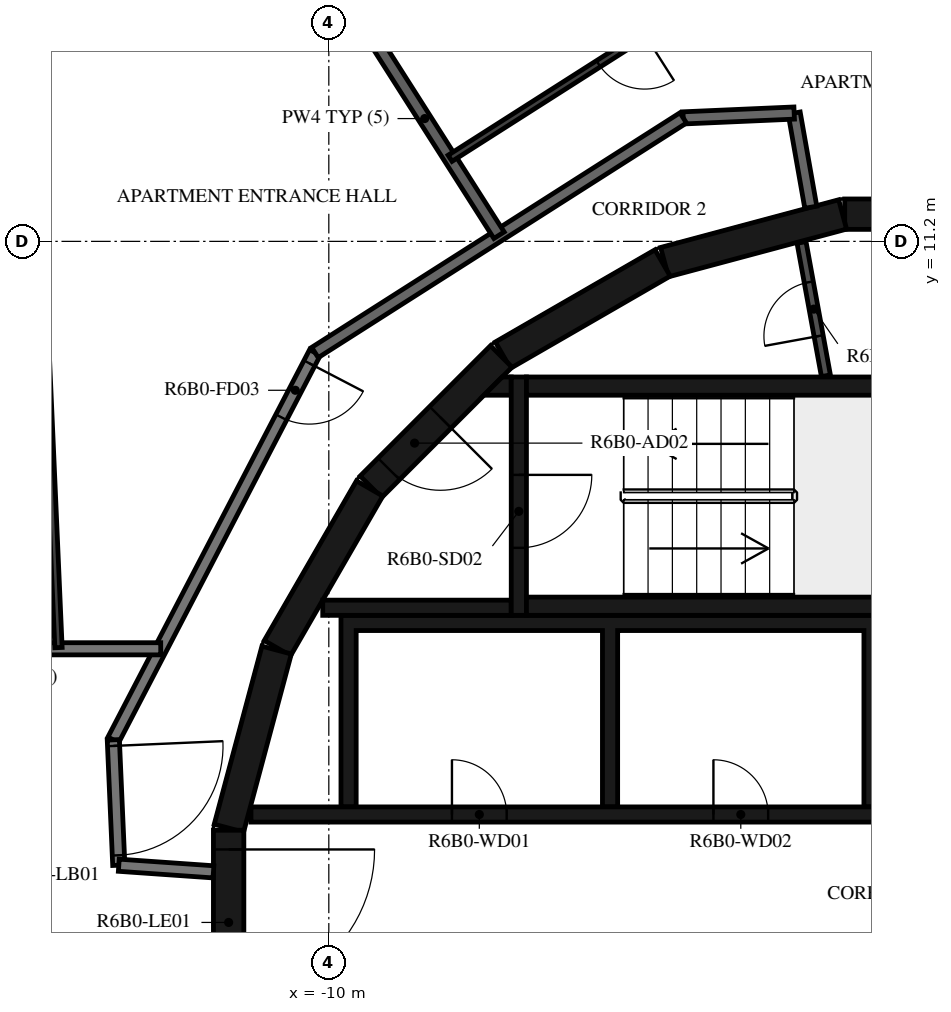
"""IFC4 building model, lengths in metres.
Left out: names, types, materials, properties, quantities, classifications, styles, units other than length and angle.
Written with IfcOpenShell. Run it as: python <this file> out.ifc"""

import sys

from ifc_helpers import new_model, si_unit, direction, frame, frame_2d, origin, place, context, subcontext, project, spatial, polyline, rectangle, outline, extrude, element, fill, save


model = new_model("IFC4")
c1 = context("Model", 3, precision=1e-05, world=origin(), true_north=direction((0.0, 1.0)))
c2 = subcontext(c1, "Body", "Model", "MODEL_VIEW")
j1 = project(units=[si_unit("LENGTHUNIT", "METRE"), si_unit("PLANEANGLEUNIT", "RADIAN")], contexts=[c1])
p1 = place(None, origin())
s1 = spatial("IfcSite", under=j1, at=p1, CompositionType="ELEMENT")
p2 = place(p1, origin())
s2 = spatial("IfcBuilding", under=s1, at=p2, CompositionType="ELEMENT")
p3 = place(p2, frame((0.0, 0.0, 240.7)))
s3 = spatial("IfcBuildingStorey", under=s2, at=p3, CompositionType="ELEMENT", Elevation=240.7)
for number, where, z_axis, x_axis in (
    (1, (1.516, 11.647, 0.0), (0.0, 0.0, 1.0), (-1.0, 0.0, 0.0)),
    (2, (-1.55, 11.643, 0.0), (0.0, 0.0, 1.0), (-0.966, -0.259, 0.0)),
    (3, (-4.51, 10.845, 0.0), (0.0, 0.0, 1.0), (-0.866, -0.5, 0.0)),
):
    element("IfcWall", number, at=place(p3, frame(where, z_axis=z_axis, x_axis=x_axis)), inside=s3, PredefinedType="SHEAR", context=c2, shape_type="SweptSolid", body=[
        extrude(rectangle(XDim=3.033, YDim=0.5, at=frame_2d((1.516, 0.0))), origin(), (0.0, 0.0, 1.0), 3.12),
    ])
p4 = place(p3, frame((-7.164, 9.308, 0.0), z_axis=(0.0, 0.0, 1.0), x_axis=(-0.707106781187, -0.707106781187, 0.0)))
e4 = element("IfcWall", 4, at=p4, inside=s3, PredefinedType="SHEAR", context=c2, shape_type="SweptSolid", body=[
    extrude(rectangle(XDim=3.032, YDim=0.5, at=frame_2d((1.516, 0.0))), origin(), (0.0, 0.0, 1.0), 3.12),
])
p5 = place(p4, frame((1.416, 0.0, 0.0)))
e5 = element("IfcOpeningElement", 5, at=p5, cuts=e4, PredefinedType="OPENING", context=c2, shape_type="SweptSolid", body=[
    extrude(rectangle(XDim=1.2, YDim=2.1, at=frame_2d((0.6, 1.05))), frame((0.0, 0.26, 0.0), z_axis=(0.0, -1.0, 0.0), x_axis=(1.0, 0.0, 0.0)), (0.0, 0.0, 1.0), 0.52),
])
for number, where, z_axis, x_axis in (
    (6, (-9.329, 7.137, 0.0), (0.0, 0.0, 1.0), (-0.5, -0.866, 0.0)),
    (7, (-10.858, 4.479, 0.0), (0.0, 0.0, 1.0), (-0.259, -0.966, 0.0)),
):
    element("IfcWall", number, at=place(p3, frame(where, z_axis=z_axis, x_axis=x_axis)), inside=s3, PredefinedType="SHEAR", context=c2, shape_type="SweptSolid", body=[
        extrude(rectangle(XDim=3.033, YDim=0.5, at=frame_2d((1.516, 0.0))), origin(), (0.0, 0.0, 1.0), 3.12),
    ])
p6 = place(p3, frame((-11.647, 1.516, 0.0), z_axis=(0.0, 0.0, 1.0), x_axis=(0.0, -1.0, 0.0)))
e8 = element("IfcWall", 8, at=p6, inside=s3, PredefinedType="SHEAR", context=c2, shape_type="SweptSolid", body=[
    extrude(rectangle(XDim=3.033, YDim=0.5, at=frame_2d((1.516, 0.0))), origin(), (0.0, 0.0, 1.0), 3.12),
])
p7 = place(p6, frame((0.316, 0.0, 0.0)))
e9 = element("IfcOpeningElement", 9, at=p7, cuts=e8, PredefinedType="OPENING", context=c2, shape_type="SweptSolid", body=[
    extrude(rectangle(XDim=2.4, YDim=2.1, at=frame_2d((1.2, 1.05))), frame((0.0, 0.26, 0.0), z_axis=(0.0, -1.0, 0.0), x_axis=(1.0, 0.0, 0.0)), (0.0, 0.0, 1.0), 0.52),
])
for number, where, z_axis, x_axis in (
    (10, (-6.75, 5.2, 0.0), (0.0, 0.0, 1.0), (1.0, 0.0, 0.0)),
    (11, (-6.75, 8.82, 0.0), (0.0, 0.0, 1.0), (1.0, 0.0, 0.0)),
):
    element("IfcWall", number, at=place(p3, frame(where, z_axis=z_axis, x_axis=x_axis)), inside=s3, PredefinedType="SHEAR", context=c2, shape_type="SweptSolid", body=[
        extrude(rectangle(XDim=6.75, YDim=0.3, at=frame_2d((3.375, 0.0))), origin(), (0.0, 0.0, 1.0), 3.12),
    ])
p8 = place(p3, frame((-6.875, 8.97, 0.0), z_axis=(0.0, 0.0, 1.0), x_axis=(0.0, -1.0, 0.0)))
e12 = element("IfcWall", 12, at=p8, inside=s3, PredefinedType="SHEAR", context=c2, shape_type="SweptSolid", body=[
    extrude(rectangle(XDim=3.92, YDim=0.25, at=frame_2d((1.96, 0.0))), origin(), (0.0, 0.0, 1.0), 3.12),
])
p9 = place(p8, frame((1.61, 0.0, 0.0)))
e13 = element("IfcOpeningElement", 13, at=p9, cuts=e12, PredefinedType="OPENING", context=c2, shape_type="SweptSolid", body=[
    extrude(rectangle(XDim=1.2, YDim=2.1, at=frame_2d((0.6, 1.05))), frame((0.0, 0.135, 0.0), z_axis=(0.0, -1.0, 0.0), x_axis=(1.0, 0.0, 0.0)), (0.0, 0.0, 1.0), 0.27),
])
p10 = place(p3, frame((-7.0, 5.175, 0.0), z_axis=(0.0, 0.0, 1.0), x_axis=(-1.0, 0.0, 0.0)))
e14 = element("IfcWall", 14, at=p10, inside=s3, PredefinedType="SHEAR", context=c2, shape_type="SweptSolid", body=[
    extrude(rectangle(XDim=3.1, YDim=0.25, at=frame_2d((1.55, 0.0))), origin(), (0.0, 0.0, 1.0), 3.12),
])
p11 = place(p3, origin())
e15 = element("IfcWall", 15, at=p11, inside=s3, PredefinedType="SHEAR", context=c2, shape_type="SweptSolid", body=[
    extrude(outline(polyline([(-7.148, 8.97), (-7.0, 8.97), (-7.0, 8.67), (-7.448, 8.67), (-7.148, 8.97)])), origin(), (0.0, 0.0, 1.0), 3.12),
])
p12 = place(p3, origin())
e16 = element("IfcWall", 16, at=p12, inside=s3, PredefinedType="SHEAR", context=c2, shape_type="SweptSolid", body=[
    extrude(outline(polyline([(-9.55, 4.8), (-5.5, 4.8), (-5.5, 1.9), (-5.25, 1.9), (-5.25, 4.8), (-1.2, 4.8), (-1.2, 1.9), (-0.95, 1.9), (-0.95, 4.8), (0.95, 4.8), (0.95, 1.9), (1.2, 1.9), (1.2, 4.8), (3.1, 4.8), (3.1, 1.9), (3.35, 1.9), (3.35, 4.8), (5.25, 4.8), (5.25, 1.9), (5.5, 1.9), (5.5, 4.8), (7.4, 4.8), (7.4, 1.9), (7.65, 1.9), (7.65, 4.8), (9.55, 4.8), (9.55, 1.9), (9.8, 1.9), (9.8, 4.8), (9.8, 5.05), (-9.8, 5.05), (-9.8, 4.8), (-9.8, 1.9), (-9.55, 1.9), (-9.55, 4.8)])), origin(), (0.0, 0.0, 1.0), 3.12),
])
p13 = place(p3, frame((-11.28, 1.775, 0.0), z_axis=(0.0, 0.0, 1.0), x_axis=(1.0, 0.0, 0.0)))
e17 = element("IfcWall", 17, at=p13, inside=s3, PredefinedType="SHEAR", context=c2, shape_type="SweptSolid", body=[
    extrude(rectangle(XDim=14.38, YDim=0.25, at=frame_2d((7.19, 0.0))), origin(), (0.0, 0.0, 1.0), 3.12),
])
p14 = place(p13, frame((10.73, 0.0, 0.0)))
e18 = element("IfcOpeningElement", 18, at=p14, cuts=e17, PredefinedType="OPENING", context=c2, shape_type="SweptSolid", body=[
    extrude(rectangle(XDim=1.1, YDim=2.1, at=frame_2d((0.55, 1.05))), frame((0.0, 0.135, 0.0), z_axis=(0.0, -1.0, 0.0), x_axis=(1.0, 0.0, 0.0)), (0.0, 0.0, 1.0), 0.27),
])
p15 = place(p13, frame((12.88, 0.0, 0.0)))
e19 = element("IfcOpeningElement", 19, at=p15, cuts=e17, PredefinedType="OPENING", context=c2, shape_type="SweptSolid", body=[
    extrude(rectangle(XDim=1.1, YDim=2.1, at=frame_2d((0.55, 1.05))), frame((0.0, 0.135, 0.0), z_axis=(0.0, -1.0, 0.0), x_axis=(1.0, 0.0, 0.0)), (0.0, 0.0, 1.0), 0.27),
])
p16 = place(p13, frame((3.305, 0.0, 0.0)))
e20 = element("IfcOpeningElement", 20, at=p16, cuts=e17, PredefinedType="OPENING", context=c2, shape_type="SweptSolid", body=[
    extrude(rectangle(XDim=0.9, YDim=2.1, at=frame_2d((0.45, 1.05))), frame((0.0, 0.135, 0.0), z_axis=(0.0, -1.0, 0.0), x_axis=(1.0, 0.0, 0.0)), (0.0, 0.0, 1.0), 0.27),
])
p17 = place(p13, frame((7.605, 0.0, 0.0)))
e21 = element("IfcOpeningElement", 21, at=p17, cuts=e17, PredefinedType="OPENING", context=c2, shape_type="SweptSolid", body=[
    extrude(rectangle(XDim=0.9, YDim=2.1, at=frame_2d((0.45, 1.05))), frame((0.0, 0.135, 0.0), z_axis=(0.0, -1.0, 0.0), x_axis=(1.0, 0.0, 0.0)), (0.0, 0.0, 1.0), 0.27),
])
p18 = place(p3, frame((-1.825, 8.99, 0.0), z_axis=(0.0, 0.0, 1.0), x_axis=(-0.179955206115, 0.983674805915, 0.0)))
e22 = element("IfcWall", 22, at=p18, inside=s3, PredefinedType="PARTITIONING", context=c2, shape_type="SweptSolid", body=[
    extrude(rectangle(XDim=2.229, YDim=0.15, at=frame_2d((1.115, 0.0))), origin(), (0.0, 0.0, 1.0), 3.12),
])
p19 = place(p18, frame((0.665, 0.0, 0.0)))
e23 = element("IfcOpeningElement", 23, at=p19, cuts=e22, PredefinedType="OPENING", context=c2, shape_type="SweptSolid", body=[
    extrude(rectangle(XDim=0.9, YDim=2.1, at=frame_2d((0.45, 1.05))), frame((0.0, 0.085, 0.0), z_axis=(0.0, -1.0, 0.0), x_axis=(1.0, 0.0, 0.0)), (0.0, 0.0, 1.0), 0.17),
])
p20 = place(p3, frame((-10.228, 9.372, 0.0), z_axis=(0.0, 0.0, 1.0), x_axis=(-0.461759464021, -0.887005184532, 0.0)))
e24 = element("IfcWall", 24, at=p20, inside=s3, PredefinedType="STANDARD", context=c2, shape_type="SweptSolid", body=[
    extrude(rectangle(XDim=7.181, YDim=0.2, at=frame_2d((3.591, 0.0))), origin(), (0.0, 0.0, 1.0), 3.12),
])
p21 = place(p20, frame((0.2, 0.0, 0.0)))
e25 = element("IfcOpeningElement", 25, at=p21, cuts=e24, PredefinedType="OPENING", context=c2, shape_type="SweptSolid", body=[
    extrude(rectangle(XDim=1.0, YDim=2.1, at=frame_2d((0.5, 1.05))), frame((0.0, 0.11, 0.0), z_axis=(0.0, -1.0, 0.0), x_axis=(1.0, 0.0, 0.0)), (0.0, 0.0, 1.0), 0.22),
])
p22 = place(p3, frame((-13.544, 3.003, 0.0), z_axis=(0.0, 0.0, 1.0), x_axis=(0.043652842459, -0.99904676034, 0.0)))
e26 = element("IfcWall", 26, at=p22, inside=s3, PredefinedType="STANDARD", context=c2, shape_type="SweptSolid", body=[
    extrude(rectangle(XDim=2.064, YDim=0.2, at=frame_2d((1.032, 0.0))), origin(), (0.0, 0.0, 1.0), 3.12),
])
p23 = place(p22, frame((0.1, 0.0, 0.0)))
e27 = element("IfcOpeningElement", 27, at=p23, cuts=e26, PredefinedType="OPENING", context=c2, shape_type="SweptSolid", body=[
    extrude(rectangle(XDim=1.8, YDim=2.1, at=frame_2d((0.9, 1.05))), frame((0.0, 0.11, 0.0), z_axis=(0.0, -1.0, 0.0), x_axis=(1.0, 0.0, 0.0)), (0.0, 0.0, 1.0), 0.22),
])
p24 = place(p3, frame((-13.454, 0.941, 0.0), z_axis=(0.0, 0.0, 1.0), x_axis=(0.99755155062, -0.069934997354, 0.0)))
e28 = element("IfcWall", 28, at=p24, inside=s3, PredefinedType="STANDARD", context=c2, shape_type="SweptSolid", body=[
    extrude(rectangle(XDim=1.561, YDim=0.2, at=frame_2d((0.78, 0.0))), origin(), (0.0, 0.0, 1.0), 3.12),
])
p25 = place(p3, frame((-2.074, 11.761, 0.0), z_axis=(0.0, 0.0, 1.0), x_axis=(-0.173679082312, 0.984802303189, 0.0)))
e29 = element("IfcWall", 29, at=p25, inside=s3, PredefinedType="STANDARD", context=c2, shape_type="SweptSolid", body=[
    extrude(rectangle(XDim=1.573, YDim=0.2, at=frame_2d((0.787, 0.0))), origin(), (0.0, 0.0, 1.0), 3.12),
])
p26 = place(p3, frame((-2.347, 13.31, 0.0), z_axis=(0.0, 0.0, 1.0), x_axis=(-0.999050095671, -0.043576442492, 0.0)))
e30 = element("IfcWall", 30, at=p26, inside=s3, PredefinedType="STANDARD", context=c2, shape_type="SweptSolid", body=[
    extrude(rectangle(XDim=1.826, YDim=0.2, at=frame_2d((0.913, 0.0))), origin(), (0.0, 0.0, 1.0), 3.12),
])
p27 = place(p3, frame((-4.172, 13.231, 0.0), z_axis=(0.0, 0.0, 1.0), x_axis=(-0.843388394728, -0.537304397561, 0.0)))
e31 = element("IfcWall", 31, at=p27, inside=s3, PredefinedType="STANDARD", context=c2, shape_type="SweptSolid", body=[
    extrude(rectangle(XDim=7.181, YDim=0.2, at=frame_2d((3.59, 0.0))), origin(), (0.0, 0.0, 1.0), 3.12),
])
p28 = place(p3, frame((-12.764, 4.5, 0.0), z_axis=(0.0, 0.0, 1.0), x_axis=(-1.0, 0.0, 0.0)))
e32 = element("IfcWall", 32, at=p28, inside=s3, PredefinedType="STANDARD", context=c2, shape_type="SweptSolid", body=[
    extrude(rectangle(XDim=5.135, YDim=0.2, at=frame_2d((2.568, 0.0))), origin(), (0.0, 0.0, 1.0), 3.12),
])
p29 = place(p3, frame((-9.645, 15.138, 0.0), z_axis=(0.0, 0.0, 1.0), x_axis=(0.537267800866, -0.84341170857, 0.0)))
e33 = element("IfcWall", 33, at=p29, inside=s3, PredefinedType="STANDARD", context=c2, shape_type="SweptSolid", body=[
    extrude(rectangle(XDim=4.55, YDim=0.2, at=frame_2d((2.275, 0.0))), origin(), (0.0, 0.0, 1.0), 3.12),
])
p30 = place(p3, frame((-4.639, 14.712, 0.0), z_axis=(0.0, 0.0, 1.0), x_axis=(-0.843376843237, -0.537322529113, 0.0)))
e34 = element("IfcWall", 34, at=p30, inside=s3, PredefinedType="PARTITIONING", context=c2, shape_type="SweptSolid", body=[
    extrude(rectangle(XDim=3.992, YDim=0.12, at=frame_2d((1.996, 0.0))), origin(), (0.0, 0.0, 1.0), 3.12),
])
p31 = place(p30, frame((0.2, 0.0, 0.0)))
e35 = element("IfcOpeningElement", 35, at=p31, cuts=e34, PredefinedType="OPENING", context=c2, shape_type="SweptSolid", body=[
    extrude(rectangle(XDim=0.9, YDim=2.1, at=frame_2d((0.45, 1.05))), frame((0.0, 0.07, 0.0), z_axis=(0.0, -1.0, 0.0), x_axis=(1.0, 0.0, 0.0)), (0.0, 0.0, 1.0), 0.14),
])
p32 = place(p3, frame((-14.955, 16.187, 0.0), z_axis=(0.0, 0.0, 1.0), x_axis=(0.04360777668, -0.999048728448, 0.0)))
e36 = element("IfcWall", 36, at=p32, inside=s3, PredefinedType="PARTITIONING", context=c2, shape_type="SweptSolid", body=[
    extrude(rectangle(XDim=11.679, YDim=0.12, at=frame_2d((5.839, 0.0))), origin(), (0.0, 0.0, 1.0), 3.12),
])
p33 = place(p32, frame((0.709, 0.0, 0.0)))
e37 = element("IfcOpeningElement", 37, at=p33, cuts=e36, PredefinedType="OPENING", context=c2, shape_type="SweptSolid", body=[
    extrude(rectangle(XDim=0.9, YDim=2.1, at=frame_2d((0.45, 1.05))), frame((0.0, 0.07, 0.0), z_axis=(0.0, -1.0, 0.0), x_axis=(1.0, 0.0, 0.0)), (0.0, 0.0, 1.0), 0.14),
])
p34 = place(p9, origin())
e38 = element("IfcDoor", 38, at=p34, inside=s3, OperationType="SINGLE_SWING_LEFT", PredefinedType="DOOR", context=c2, shape_type="SweptSolid", body=[
    extrude(rectangle(XDim=1.2, YDim=2.1, at=frame_2d((0.6, 1.05))), frame((0.0, 0.025, 0.0), z_axis=(0.0, -1.0, 0.0), x_axis=(1.0, 0.0, 0.0)), (0.0, 0.0, 1.0), 0.05),
])
fill(e13, e38)
p35 = place(p5, origin())
e39 = element("IfcDoor", 39, at=p35, inside=s3, OperationType="SINGLE_SWING_RIGHT", PredefinedType="DOOR", context=c2, shape_type="SweptSolid", body=[
    extrude(rectangle(XDim=1.2, YDim=2.1, at=frame_2d((0.6, 1.05))), frame((0.0, 0.025, 0.0), z_axis=(0.0, -1.0, 0.0), x_axis=(1.0, 0.0, 0.0)), (0.0, 0.0, 1.0), 0.05),
])
fill(e5, e39)
p36 = place(p7, origin())
e40 = element("IfcDoor", 40, at=p36, inside=s3, OperationType="DOUBLE_DOOR_SINGLE_SWING", PredefinedType="DOOR", context=c2, shape_type="SweptSolid", body=[
    extrude(rectangle(XDim=2.4, YDim=2.1, at=frame_2d((1.2, 1.05))), frame((0.0, 0.025, 0.0), z_axis=(0.0, -1.0, 0.0), x_axis=(1.0, 0.0, 0.0)), (0.0, 0.0, 1.0), 0.05),
])
fill(e9, e40)
p37 = place(p16, origin())
e41 = element("IfcDoor", 41, at=p37, inside=s3, OperationType="SINGLE_SWING_LEFT", PredefinedType="DOOR", context=c2, shape_type="SweptSolid", body=[
    extrude(rectangle(XDim=0.9, YDim=2.1, at=frame_2d((0.45, 1.05))), frame((0.0, 0.025, 0.0), z_axis=(0.0, -1.0, 0.0), x_axis=(1.0, 0.0, 0.0)), (0.0, 0.0, 1.0), 0.05),
])
fill(e20, e41)
p38 = place(p17, origin())
e42 = element("IfcDoor", 42, at=p38, inside=s3, OperationType="SINGLE_SWING_RIGHT", PredefinedType="DOOR", context=c2, shape_type="SweptSolid", body=[
    extrude(rectangle(XDim=0.9, YDim=2.1, at=frame_2d((0.45, 1.05))), frame((0.0, 0.025, 0.0), z_axis=(0.0, -1.0, 0.0), x_axis=(1.0, 0.0, 0.0)), (0.0, 0.0, 1.0), 0.05),
])
fill(e21, e42)
p39 = place(p19, origin())
e43 = element("IfcDoor", 43, at=p39, inside=s3, OperationType="SINGLE_SWING_LEFT", PredefinedType="DOOR", context=c2, shape_type="SweptSolid", body=[
    extrude(rectangle(XDim=0.9, YDim=2.1, at=frame_2d((0.45, 1.05))), frame((0.0, 0.025, 0.0), z_axis=(0.0, -1.0, 0.0), x_axis=(1.0, 0.0, 0.0)), (0.0, 0.0, 1.0), 0.05),
])
fill(e23, e43)
p40 = place(p31, origin())
e44 = element("IfcDoor", 44, at=p40, inside=s3, OperationType="SINGLE_SWING_RIGHT", PredefinedType="DOOR", context=c2, shape_type="SweptSolid", body=[
    extrude(rectangle(XDim=0.9, YDim=2.1, at=frame_2d((0.45, 1.05))), frame((0.0, 0.025, 0.0), z_axis=(0.0, -1.0, 0.0), x_axis=(1.0, 0.0, 0.0)), (0.0, 0.0, 1.0), 0.05),
])
fill(e35, e44)
p41 = place(p21, origin())
e45 = element("IfcDoor", 45, at=p41, inside=s3, OperationType="SINGLE_SWING_LEFT", PredefinedType="DOOR", context=c2, shape_type="SweptSolid", body=[
    extrude(rectangle(XDim=1.0, YDim=2.1, at=frame_2d((0.5, 1.05))), frame((0.0, 0.025, 0.0), z_axis=(0.0, -1.0, 0.0), x_axis=(1.0, 0.0, 0.0)), (0.0, 0.0, 1.0), 0.05),
])
fill(e25, e45)
p42 = place(p23, origin())
e46 = element("IfcDoor", 46, at=p42, inside=s3, OperationType="DOUBLE_DOOR_SINGLE_SWING", PredefinedType="DOOR", context=c2, shape_type="SweptSolid", body=[
    extrude(rectangle(XDim=1.8, YDim=2.1, at=frame_2d((0.9, 1.05))), frame((0.0, 0.025, 0.0), z_axis=(0.0, -1.0, 0.0), x_axis=(1.0, 0.0, 0.0)), (0.0, 0.0, 1.0), 0.05),
])
fill(e27, e46)
save(model, sys.argv[1])
